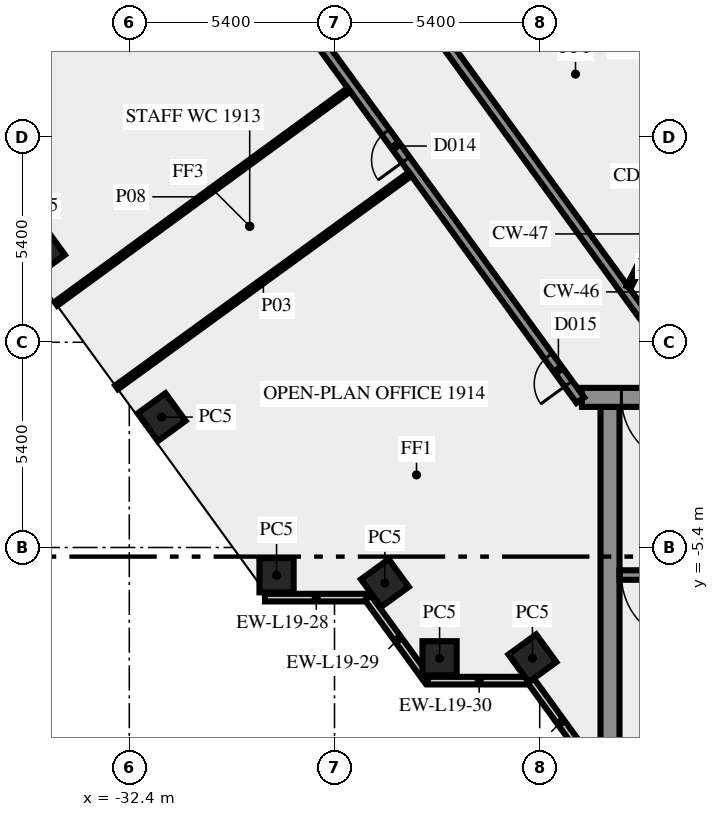
"""IFC4 building model, lengths in metres.
Left out: names, types, materials, properties, quantities, classifications, styles, units other than length and angle.
Written with IfcOpenShell. Run it as: python <this file> out.ifc"""

import sys

from ifc_helpers import new_model, si_unit, direction, frame, frame_2d, origin, origin_2d, place, context, subcontext, project, spatial, rectangle, extrude, element, fill, save


model = new_model("IFC4")
c1 = context("Model", 3, precision=1e-05, world=origin(), true_north=direction((0.0, 1.0)))
c2 = subcontext(c1, "Body", "Model", "MODEL_VIEW")
j1 = project(units=[si_unit("LENGTHUNIT", "METRE"), si_unit("PLANEANGLEUNIT", "RADIAN")], contexts=[c1])
p1 = place(None, origin())
s1 = spatial("IfcSite", under=j1, at=p1, CompositionType="ELEMENT")
p2 = place(p1, origin())
s2 = spatial("IfcBuilding", under=s1, at=p2, CompositionType="ELEMENT")
p3 = place(p2, frame((0.0, 0.0, 85.0)))
s3 = spatial("IfcBuildingStorey", under=s2, at=p3, CompositionType="ELEMENT", Elevation=85.0)
for number, where, z_axis, x_axis in (
    (1, (-34.722, 2.4, 0.0), (0.0, 0.0, 1.0), (0.588, -0.809, 0.0)),
    (2, (-31.548, -1.969, 0.0), (0.0, 0.0, 1.0), (0.588, -0.809, 0.0)),
    (3, (-28.525, -6.13, 0.0), (0.0, 0.0, 1.0), (1.0, 0.0, 0.0)),
    (4, (-25.674, -6.337, 0.0), (0.0, 0.0, 1.0), (0.588, -0.809, 0.0)),
    (5, (-24.235, -8.315, 0.0), (0.0, 0.0, 1.0), (1.0, 0.0, 0.0)),
    (6, (-21.792, -8.315, 0.0), (0.0, 0.0, 1.0), (0.588, -0.809, 0.0)),
):
    element("IfcColumn", number, at=place(p3, frame(where, z_axis=z_axis, x_axis=x_axis)), inside=s3, PredefinedType="COLUMN", context=c2, shape_type="SweptSolid", body=[
        extrude(rectangle(XDim=0.9, YDim=0.9, at=origin_2d()), origin(), (0.0, 0.0, 1.0), 3.65),
    ])
p4 = place(p3, frame((-28.83, -6.719, 0.0), z_axis=(0.0, 0.0, 1.0), x_axis=(1.0, 0.0, 0.0)))
e7 = element("IfcWall", 7, at=p4, inside=s3, PredefinedType="SOLIDWALL", context=c2, shape_type="SweptSolid", body=[
    extrude(rectangle(XDim=2.7, YDim=0.2, at=frame_2d((1.35, 0.0))), origin(), (0.0, 0.0, 1.0), 3.65),
])
p5 = place(p3, frame((-26.12, -6.724, 0.0), z_axis=(0.0, 0.0, 1.0), x_axis=(0.587720002413, -0.809064397168, 0.0)))
e8 = element("IfcWall", 8, at=p5, inside=s3, PredefinedType="SOLIDWALL", context=c2, shape_type="SweptSolid", body=[
    extrude(rectangle(XDim=2.7, YDim=0.2, at=frame_2d((1.35, 0.0))), origin(), (0.0, 0.0, 1.0), 3.65),
])
p6 = place(p3, frame((-24.543, -8.904, 0.0), z_axis=(0.0, 0.0, 1.0), x_axis=(1.0, 0.0, 0.0)))
e9 = element("IfcWall", 9, at=p6, inside=s3, PredefinedType="SOLIDWALL", context=c2, shape_type="SweptSolid", body=[
    extrude(rectangle(XDim=2.7, YDim=0.2, at=frame_2d((1.35, 0.0))), origin(), (0.0, 0.0, 1.0), 3.65),
])
p7 = place(p3, frame((-21.833, -8.909, 0.0), z_axis=(0.0, 0.0, 1.0), x_axis=(0.587766567315, -0.809030569476, 0.0)))
e10 = element("IfcWall", 10, at=p7, inside=s3, PredefinedType="SOLIDWALL", context=c2, shape_type="SweptSolid", body=[
    extrude(rectangle(XDim=2.688, YDim=0.2, at=frame_2d((1.344, 0.0))), origin(), (0.0, 0.0, 1.0), 3.65),
])
p8 = place(p3, frame((-19.75, -10.5, 0.0), z_axis=(0.0, 0.0, 1.0), x_axis=(0.0, 1.0, 0.0)))
e11 = element("IfcWall", 11, at=p8, inside=s3, PredefinedType="SHEAR", context=c2, shape_type="SweptSolid", body=[
    extrude(rectangle(XDim=8.8, YDim=0.5, at=frame_2d((4.4, 0.0))), origin(), (0.0, 0.0, 1.0), 3.65),
])
p9 = place(p3, frame((-11.45, -6.125, 0.0), z_axis=(0.0, 0.0, 1.0), x_axis=(-1.0, 0.0, 0.0)))
e12 = element("IfcWall", 12, at=p9, inside=s3, PredefinedType="SHEAR", context=c2, shape_type="SweptSolid", body=[
    extrude(rectangle(XDim=8.05, YDim=0.25, at=frame_2d((4.025, 0.0))), origin(), (0.0, 0.0, 1.0), 3.65),
])
p10 = place(p9, frame((6.2, 0.0, 0.0)))
e13 = element("IfcOpeningElement", 13, at=p10, cuts=e12, PredefinedType="OPENING", context=c2, shape_type="SweptSolid", body=[
    extrude(rectangle(XDim=1.8, YDim=2.1, at=frame_2d((0.9, 1.05))), frame((0.0, 0.135, 0.0), z_axis=(0.0, -1.0, 0.0), x_axis=(1.0, 0.0, 0.0)), (0.0, 0.0, 1.0), 0.27),
])
p11 = place(p3, frame((20.49, -1.45, 0.0), z_axis=(0.0, 0.0, 1.0), x_axis=(-1.0, 0.0, 0.0)))
e14 = element("IfcWall", 14, at=p11, inside=s3, PredefinedType="SHEAR", context=c2, shape_type="SweptSolid", body=[
    extrude(rectangle(XDim=40.98, YDim=0.5, at=frame_2d((20.49, 0.0))), origin(), (0.0, 0.0, 1.0), 3.65),
])
p12 = place(p11, frame((38.14, 0.0, 0.0)))
e15 = element("IfcOpeningElement", 15, at=p12, cuts=e14, PredefinedType="OPENING", context=c2, shape_type="SweptSolid", body=[
    extrude(rectangle(XDim=1.8, YDim=2.1, at=frame_2d((0.9, 1.05))), frame((0.0, 0.26, 0.0), z_axis=(0.0, -1.0, 0.0), x_axis=(1.0, 0.0, 0.0)), (0.0, 0.0, 1.0), 0.52),
])
p13 = place(p11, frame((35.89, 0.0, 0.0)))
e16 = element("IfcOpeningElement", 16, at=p13, cuts=e14, PredefinedType="OPENING", context=c2, shape_type="SweptSolid", body=[
    extrude(rectangle(XDim=0.9, YDim=2.1, at=frame_2d((0.45, 1.05))), frame((0.0, 0.26, 0.0), z_axis=(0.0, -1.0, 0.0), x_axis=(1.0, 0.0, 0.0)), (0.0, 0.0, 1.0), 0.52),
])
p14 = place(p11, frame((32.94, 0.0, 0.0)))
e17 = element("IfcOpeningElement", 17, at=p14, cuts=e14, PredefinedType="OPENING", context=c2, shape_type="SweptSolid", body=[
    extrude(rectangle(XDim=0.9, YDim=2.1, at=frame_2d((0.45, 1.05))), frame((0.0, 0.26, 0.0), z_axis=(0.0, -1.0, 0.0), x_axis=(1.0, 0.0, 0.0)), (0.0, 0.0, 1.0), 0.52),
])
p15 = place(p11, frame((21.765, 0.0, 0.0)))
e18 = element("IfcOpeningElement", 18, at=p15, cuts=e14, PredefinedType="OPENING", context=c2, shape_type="SweptSolid", body=[
    extrude(rectangle(XDim=2.0, YDim=2.1, at=frame_2d((1.0, 1.05))), frame((0.0, 0.26, 0.0), z_axis=(0.0, -1.0, 0.0), x_axis=(1.0, 0.0, 0.0)), (0.0, 0.0, 1.0), 0.52),
])
p16 = place(p11, frame((7.14, 0.0, 0.0)))
e19 = element("IfcOpeningElement", 19, at=p16, cuts=e14, PredefinedType="OPENING", context=c2, shape_type="SweptSolid", body=[
    extrude(rectangle(XDim=0.9, YDim=2.1, at=frame_2d((0.45, 1.05))), frame((0.0, 0.26, 0.0), z_axis=(0.0, -1.0, 0.0), x_axis=(1.0, 0.0, 0.0)), (0.0, 0.0, 1.0), 0.52),
])
p17 = place(p11, frame((5.028, 0.0, 0.0)))
e20 = element("IfcOpeningElement", 20, at=p17, cuts=e14, PredefinedType="OPENING", context=c2, shape_type="SweptSolid", body=[
    extrude(rectangle(XDim=0.8, YDim=2.1, at=frame_2d((0.4, 1.05))), frame((0.0, 0.26, 0.0), z_axis=(0.0, -1.0, 0.0), x_axis=(1.0, 0.0, 0.0)), (0.0, 0.0, 1.0), 0.52),
])
p18 = place(p11, frame((3.452, 0.0, 0.0)))
e21 = element("IfcOpeningElement", 21, at=p18, cuts=e14, PredefinedType="OPENING", context=c2, shape_type="SweptSolid", body=[
    extrude(rectangle(XDim=0.8, YDim=2.1, at=frame_2d((0.4, 1.05))), frame((0.0, 0.26, 0.0), z_axis=(0.0, -1.0, 0.0), x_axis=(1.0, 0.0, 0.0)), (0.0, 0.0, 1.0), 0.52),
])
p19 = place(p11, frame((1.04, 0.0, 0.0)))
e22 = element("IfcOpeningElement", 22, at=p19, cuts=e14, PredefinedType="OPENING", context=c2, shape_type="SweptSolid", body=[
    extrude(rectangle(XDim=1.8, YDim=2.1, at=frame_2d((0.9, 1.05))), frame((0.0, 0.26, 0.0), z_axis=(0.0, -1.0, 0.0), x_axis=(1.0, 0.0, 0.0)), (0.0, 0.0, 1.0), 0.52),
])
p20 = place(p3, frame((-20.531, -1.523, 0.0), z_axis=(0.0, 0.0, 1.0), x_axis=(-0.587784522481, 0.809017524614, 0.0)))
e23 = element("IfcWall", 23, at=p20, inside=s3, PredefinedType="SOLIDWALL", context=c2, shape_type="SweptSolid", body=[
    extrude(rectangle(XDim=49.912, YDim=0.25, at=frame_2d((24.956, 0.0))), origin(), (0.0, 0.0, 1.0), 3.65),
])
p21 = place(p20, frame((0.533, 0.0, 0.0)))
e24 = element("IfcOpeningElement", 24, at=p21, cuts=e23, PredefinedType="OPENING", context=c2, shape_type="SweptSolid", body=[
    extrude(rectangle(XDim=0.9, YDim=2.1, at=frame_2d((0.45, 1.05))), frame((0.0, 0.135, 0.0), z_axis=(0.0, -1.0, 0.0), x_axis=(1.0, 0.0, 0.0)), (0.0, 0.0, 1.0), 0.27),
])
p22 = place(p20, frame((48.47, 0.0, 0.0)))
e25 = element("IfcOpeningElement", 25, at=p22, cuts=e23, PredefinedType="OPENING", context=c2, shape_type="SweptSolid", body=[
    extrude(rectangle(XDim=1.0, YDim=2.1, at=frame_2d((0.5, 1.05))), frame((0.0, 0.135, 0.0), z_axis=(0.0, -1.0, 0.0), x_axis=(1.0, 0.0, 0.0)), (0.0, 0.0, 1.0), 0.27),
])
p23 = place(p20, frame((17.365, 0.0, 0.0)))
e26 = element("IfcOpeningElement", 26, at=p23, cuts=e23, PredefinedType="OPENING", context=c2, shape_type="SweptSolid", body=[
    extrude(rectangle(XDim=1.8, YDim=2.1, at=frame_2d((0.9, 1.05))), frame((0.0, 0.135, 0.0), z_axis=(0.0, -1.0, 0.0), x_axis=(1.0, 0.0, 0.0)), (0.0, 0.0, 1.0), 0.27),
])
p24 = place(p20, frame((7.816, 0.0, 0.0)))
e27 = element("IfcOpeningElement", 27, at=p24, cuts=e23, PredefinedType="OPENING", context=c2, shape_type="SweptSolid", body=[
    extrude(rectangle(XDim=0.9, YDim=2.1, at=frame_2d((0.45, 1.05))), frame((0.0, 0.135, 0.0), z_axis=(0.0, -1.0, 0.0), x_axis=(1.0, 0.0, 0.0)), (0.0, 0.0, 1.0), 0.27),
])
p25 = place(p3, frame((-37.232, 25.972, 0.0), z_axis=(0.0, 0.0, 1.0), x_axis=(0.587786323093, -0.809016216391, 0.0)))
e28 = element("IfcWall", 28, at=p25, inside=s3, PredefinedType="SOLIDWALL", context=c2, shape_type="SweptSolid", body=[
    extrude(rectangle(XDim=33.493, YDim=0.25, at=frame_2d((16.747, 0.0))), origin(), (0.0, 0.0, 1.0), 3.65),
])
p26 = place(p25, frame((19.135, 0.0, 0.0)))
e29 = element("IfcOpeningElement", 29, at=p26, cuts=e28, PredefinedType="OPENING", context=c2, shape_type="SweptSolid", body=[
    extrude(rectangle(XDim=0.9, YDim=2.1, at=frame_2d((0.45, 1.05))), frame((0.0, 0.135, 0.0), z_axis=(0.0, -1.0, 0.0), x_axis=(1.0, 0.0, 0.0)), (0.0, 0.0, 1.0), 0.27),
])
p27 = place(p25, frame((7.137, 0.0, 0.0)))
e30 = element("IfcOpeningElement", 30, at=p27, cuts=e28, PredefinedType="OPENING", context=c2, shape_type="SweptSolid", body=[
    extrude(rectangle(XDim=1.8, YDim=2.1, at=frame_2d((0.9, 1.05))), frame((0.0, 0.135, 0.0), z_axis=(0.0, -1.0, 0.0), x_axis=(1.0, 0.0, 0.0)), (0.0, 0.0, 1.0), 0.27),
])
p28 = place(p25, frame((16.435, 0.0, 0.0)))
e31 = element("IfcOpeningElement", 31, at=p28, cuts=e28, PredefinedType="OPENING", context=c2, shape_type="SweptSolid", body=[
    extrude(rectangle(XDim=0.9, YDim=2.1, at=frame_2d((0.45, 1.05))), frame((0.0, 0.135, 0.0), z_axis=(0.0, -1.0, 0.0), x_axis=(1.0, 0.0, 0.0)), (0.0, 0.0, 1.0), 0.27),
])
p29 = place(p3, frame((-25.008, 4.427, 0.0), z_axis=(0.0, 0.0, 1.0), x_axis=(-0.808994684961, -0.587815957341, 0.0)))
e32 = element("IfcWall", 32, at=p29, inside=s3, PredefinedType="PARTITIONING", context=c2, shape_type="SweptSolid", body=[
    extrude(rectangle(XDim=9.55, YDim=0.12, at=frame_2d((4.775, 0.0))), origin(), (0.0, 0.0, 1.0), 2.75),
])
p30 = place(p3, frame((-34.332, 1.011, 0.0), z_axis=(0.0, 0.0, 1.0), x_axis=(0.807594822539, 0.589737740532, 0.0)))
e33 = element("IfcWall", 33, at=p30, inside=s3, PredefinedType="PARTITIONING", context=c2, shape_type="SweptSolid", body=[
    extrude(rectangle(XDim=9.55, YDim=0.12, at=frame_2d((4.775, 0.0))), origin(), (0.0, 0.0, 1.0), 2.75),
])
p31 = place(p3, frame((-19.261, 1.45, 0.0), z_axis=(0.0, 0.0, 1.0), x_axis=(0.453950796792, 0.891026752736, 0.0)))
e34 = element("IfcWall", 34, at=p31, inside=s3, PredefinedType="PARTITIONING", context=c2, shape_type="SweptSolid", body=[
    extrude(rectangle(XDim=2.778, YDim=0.12, at=frame_2d((1.389, 0.0))), origin(), (0.0, 0.0, 1.0), 3.65),
])
p32 = place(p10, origin())
e35 = element("IfcDoor", 35, at=p32, inside=s3, OperationType="DOUBLE_DOOR_SINGLE_SWING", PredefinedType="DOOR", context=c2, shape_type="SweptSolid", body=[
    extrude(rectangle(XDim=1.8, YDim=2.1, at=frame_2d((0.9, 1.05))), frame((0.0, 0.025, 0.0), z_axis=(0.0, -1.0, 0.0), x_axis=(1.0, 0.0, 0.0)), (0.0, 0.0, 1.0), 0.05),
])
fill(e13, e35)
p33 = place(p12, origin())
e36 = element("IfcDoor", 36, at=p33, inside=s3, OperationType="DOUBLE_DOOR_SINGLE_SWING", PredefinedType="DOOR", context=c2, shape_type="SweptSolid", body=[
    extrude(rectangle(XDim=1.8, YDim=2.1, at=frame_2d((0.9, 1.05))), frame((0.0, 0.025, 0.0), z_axis=(0.0, -1.0, 0.0), x_axis=(1.0, 0.0, 0.0)), (0.0, 0.0, 1.0), 0.05),
])
fill(e15, e36)
p34 = place(p21, origin())
e37 = element("IfcDoor", 37, at=p34, inside=s3, OperationType="SINGLE_SWING_LEFT", PredefinedType="DOOR", context=c2, shape_type="SweptSolid", body=[
    extrude(rectangle(XDim=0.9, YDim=2.1, at=frame_2d((0.45, 1.05))), frame((0.0, 0.025, 0.0), z_axis=(0.0, -1.0, 0.0), x_axis=(1.0, 0.0, 0.0)), (0.0, 0.0, 1.0), 0.05),
])
fill(e24, e37)
p35 = place(p24, origin())
e38 = element("IfcDoor", 38, at=p35, inside=s3, OperationType="SINGLE_SWING_LEFT", PredefinedType="DOOR", context=c2, shape_type="SweptSolid", body=[
    extrude(rectangle(XDim=0.9, YDim=2.1, at=frame_2d((0.45, 1.05))), frame((0.0, 0.025, 0.0), z_axis=(0.0, -1.0, 0.0), x_axis=(1.0, 0.0, 0.0)), (0.0, 0.0, 1.0), 0.05),
])
fill(e27, e38)
save(model, sys.argv[1])
